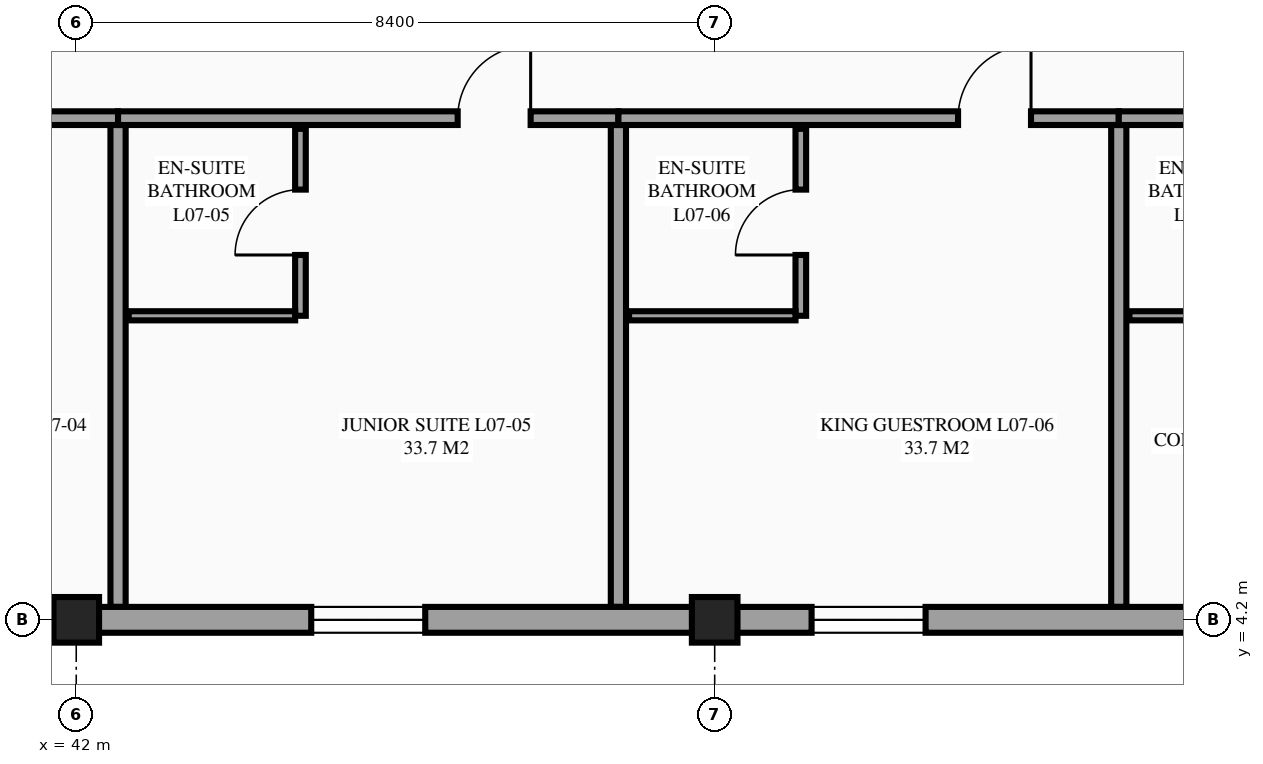
"""IFC4 building model, lengths in metres.
Left out: names, types, materials, properties, quantities, classifications, styles, units other than length and angle.
Written with IfcOpenShell. Run it as: python <this file> out.ifc"""

import sys

from ifc_helpers import new_model, si_unit, direction, frame, frame_2d, origin, origin_2d, place, context, subcontext, project, spatial, rectangle, extrude, element, fill, save


model = new_model("IFC4")
c1 = context("Model", 3, precision=1e-05, world=origin(), true_north=direction((0.0, 1.0)))
c2 = subcontext(c1, "Body", "Model", "MODEL_VIEW")
j1 = project(units=[si_unit("LENGTHUNIT", "METRE"), si_unit("PLANEANGLEUNIT", "RADIAN")], contexts=[c1])
p1 = place(None, origin())
s1 = spatial("IfcSite", under=j1, at=p1, CompositionType="ELEMENT")
p2 = place(p1, origin())
s2 = spatial("IfcBuilding", under=s1, at=p2, CompositionType="ELEMENT")
p3 = place(p2, frame((0.0, 0.0, 29.1)))
s3 = spatial("IfcBuildingStorey", under=s2, at=p3, CompositionType="ELEMENT", Elevation=29.1)
for number, where, z_axis, x_axis in (
    (1, (42.0, 4.2, 0.0), (0.0, 0.0, 1.0), (1.0, 0.0, 0.0)),
    (2, (50.4, 4.2, 0.0), (0.0, 0.0, 1.0), (1.0, 0.0, 0.0)),
):
    element("IfcColumn", number, at=place(p3, frame(where, z_axis=z_axis, x_axis=x_axis)), inside=s3, PredefinedType="COLUMN", context=c2, shape_type="SweptSolid", body=[
        extrude(rectangle(XDim=0.6, YDim=0.6, at=origin_2d()), origin(), (0.0, 0.0, 1.0), 3.6),
    ])
p4 = place(p3, frame((25.2, 4.2, 0.0), z_axis=(0.0, 0.0, 1.0), x_axis=(1.0, 0.0, 0.0)))
e3 = element("IfcWall", 3, at=p4, inside=s3, PredefinedType="STANDARD", context=c2, shape_type="SweptSolid", body=[
    extrude(rectangle(XDim=16.8, YDim=0.34, at=frame_2d((8.4, 0.0))), origin(), (0.0, 0.0, 1.0), 2.53),
])
p5 = place(p4, frame((0.792, 0.0, 0.85)))
e4 = element("IfcOpeningElement", 4, at=p5, cuts=e3, PredefinedType="OPENING", context=c2, shape_type="SweptSolid", body=[
    extrude(rectangle(XDim=1.2, YDim=1.5, at=frame_2d((0.6, 0.75))), frame((0.0, 0.18, 0.0), z_axis=(0.0, -1.0, 0.0), x_axis=(1.0, 0.0, 0.0)), (0.0, 0.0, 1.0), 0.36),
])
p6 = place(p4, frame((6.225, 0.0, 0.85)))
e5 = element("IfcOpeningElement", 5, at=p6, cuts=e3, PredefinedType="OPENING", context=c2, shape_type="SweptSolid", body=[
    extrude(rectangle(XDim=1.5, YDim=1.5, at=frame_2d((0.75, 0.75))), frame((0.0, 0.18, 0.0), z_axis=(0.0, -1.0, 0.0), x_axis=(1.0, 0.0, 0.0)), (0.0, 0.0, 1.0), 0.36),
])
p7 = place(p4, frame((13.308, 0.0, 0.85)))
e6 = element("IfcOpeningElement", 6, at=p7, cuts=e3, PredefinedType="OPENING", context=c2, shape_type="SweptSolid", body=[
    extrude(rectangle(XDim=1.5, YDim=1.5, at=frame_2d((0.75, 0.75))), frame((0.0, 0.18, 0.0), z_axis=(0.0, -1.0, 0.0), x_axis=(1.0, 0.0, 0.0)), (0.0, 0.0, 1.0), 0.36),
])
p8 = place(p3, frame((35.967, 10.8, 0.0), z_axis=(0.0, 0.0, 1.0), x_axis=(1.0, 0.0, 0.0)))
e7 = element("IfcWall", 7, at=p8, inside=s3, PredefinedType="PARTITIONING", context=c2, shape_type="SweptSolid", body=[
    extrude(rectangle(XDim=6.583, YDim=0.18, at=frame_2d((3.292, 0.0))), origin(), (0.0, 0.0, 1.0), 3.375),
])
p9 = place(p8, frame((3.769, 0.0, 0.0)))
e8 = element("IfcOpeningElement", 8, at=p9, cuts=e7, PredefinedType="OPENING", context=c2, shape_type="SweptSolid", body=[
    extrude(rectangle(XDim=0.96, YDim=2.15, at=frame_2d((0.48, 1.075))), frame((0.0, 0.1, 0.0), z_axis=(0.0, -1.0, 0.0), x_axis=(1.0, 0.0, 0.0)), (0.0, 0.0, 1.0), 0.2),
])
p10 = place(p3, frame((42.55, 4.37, 0.0), z_axis=(0.0, 0.0, 1.0), x_axis=(0.0, 1.0, 0.0)))
e9 = element("IfcWall", 9, at=p10, inside=s3, PredefinedType="PARTITIONING", context=c2, shape_type="SweptSolid", body=[
    extrude(rectangle(XDim=6.34, YDim=0.2, at=frame_2d((3.17, 0.0))), origin(), (0.0, 0.0, 1.0), 3.375),
])
p11 = place(p3, frame((42.55, 10.8, 0.0), z_axis=(0.0, 0.0, 1.0), x_axis=(1.0, 0.0, 0.0)))
e10 = element("IfcWall", 10, at=p11, inside=s3, PredefinedType="PARTITIONING", context=c2, shape_type="SweptSolid", body=[
    extrude(rectangle(XDim=6.583, YDim=0.18, at=frame_2d((3.292, 0.0))), origin(), (0.0, 0.0, 1.0), 3.375),
])
p12 = place(p11, frame((4.469, 0.0, 0.0)))
e11 = element("IfcOpeningElement", 11, at=p12, cuts=e10, PredefinedType="OPENING", context=c2, shape_type="SweptSolid", body=[
    extrude(rectangle(XDim=0.96, YDim=2.15, at=frame_2d((0.48, 1.075))), frame((0.0, 0.1, 0.0), z_axis=(0.0, -1.0, 0.0), x_axis=(1.0, 0.0, 0.0)), (0.0, 0.0, 1.0), 0.2),
])
p13 = place(p3, frame((49.133, 4.37, 0.0), z_axis=(0.0, 0.0, 1.0), x_axis=(0.0, 1.0, 0.0)))
e12 = element("IfcWall", 12, at=p13, inside=s3, PredefinedType="PARTITIONING", context=c2, shape_type="SweptSolid", body=[
    extrude(rectangle(XDim=6.34, YDim=0.2, at=frame_2d((3.17, 0.0))), origin(), (0.0, 0.0, 1.0), 3.375),
])
p14 = place(p3, frame((44.95, 8.2, 0.0), z_axis=(0.0, 0.0, 1.0), x_axis=(0.0, 1.0, 0.0)))
e13 = element("IfcWall", 13, at=p14, inside=s3, PredefinedType="PARTITIONING", context=c2, shape_type="SweptSolid", body=[
    extrude(rectangle(XDim=2.46, YDim=0.14, at=frame_2d((1.23, 0.0))), origin(), (0.0, 0.0, 1.0), 3.375),
])
p15 = place(p14, frame((0.8, 0.0, 0.0)))
e14 = element("IfcOpeningElement", 14, at=p15, cuts=e13, PredefinedType="OPENING", context=c2, shape_type="SweptSolid", body=[
    extrude(rectangle(XDim=0.86, YDim=2.1, at=frame_2d((0.43, 1.05))), frame((0.0, 0.08, 0.0), z_axis=(0.0, -1.0, 0.0), x_axis=(1.0, 0.0, 0.0)), (0.0, 0.0, 1.0), 0.16),
])
p16 = place(p3, frame((42.69, 8.2, 0.0), z_axis=(0.0, 0.0, 1.0), x_axis=(1.0, 0.0, 0.0)))
e15 = element("IfcWall", 15, at=p16, inside=s3, PredefinedType="PARTITIONING", context=c2, shape_type="SweptSolid", body=[
    extrude(rectangle(XDim=2.19, YDim=0.12, at=frame_2d((1.095, 0.0))), origin(), (0.0, 0.0, 1.0), 3.375),
])
p17 = place(p3, frame((49.133, 10.8, 0.0), z_axis=(0.0, 0.0, 1.0), x_axis=(1.0, 0.0, 0.0)))
e16 = element("IfcWall", 16, at=p17, inside=s3, PredefinedType="PARTITIONING", context=c2, shape_type="SweptSolid", body=[
    extrude(rectangle(XDim=6.583, YDim=0.18, at=frame_2d((3.292, 0.0))), origin(), (0.0, 0.0, 1.0), 3.375),
])
p18 = place(p17, frame((4.469, 0.0, 0.0)))
e17 = element("IfcOpeningElement", 17, at=p18, cuts=e16, PredefinedType="OPENING", context=c2, shape_type="SweptSolid", body=[
    extrude(rectangle(XDim=0.96, YDim=2.15, at=frame_2d((0.48, 1.075))), frame((0.0, 0.1, 0.0), z_axis=(0.0, -1.0, 0.0), x_axis=(1.0, 0.0, 0.0)), (0.0, 0.0, 1.0), 0.2),
])
p19 = place(p3, frame((55.717, 4.37, 0.0), z_axis=(0.0, 0.0, 1.0), x_axis=(0.0, 1.0, 0.0)))
e18 = element("IfcWall", 18, at=p19, inside=s3, PredefinedType="PARTITIONING", context=c2, shape_type="SweptSolid", body=[
    extrude(rectangle(XDim=6.34, YDim=0.2, at=frame_2d((3.17, 0.0))), origin(), (0.0, 0.0, 1.0), 3.375),
])
p20 = place(p3, frame((51.533, 8.2, 0.0), z_axis=(0.0, 0.0, 1.0), x_axis=(0.0, 1.0, 0.0)))
e19 = element("IfcWall", 19, at=p20, inside=s3, PredefinedType="PARTITIONING", context=c2, shape_type="SweptSolid", body=[
    extrude(rectangle(XDim=2.46, YDim=0.14, at=frame_2d((1.23, 0.0))), origin(), (0.0, 0.0, 1.0), 3.375),
])
p21 = place(p20, frame((0.8, 0.0, 0.0)))
e20 = element("IfcOpeningElement", 20, at=p21, cuts=e19, PredefinedType="OPENING", context=c2, shape_type="SweptSolid", body=[
    extrude(rectangle(XDim=0.86, YDim=2.1, at=frame_2d((0.43, 1.05))), frame((0.0, 0.08, 0.0), z_axis=(0.0, -1.0, 0.0), x_axis=(1.0, 0.0, 0.0)), (0.0, 0.0, 1.0), 0.16),
])
p22 = place(p3, frame((49.273, 8.2, 0.0), z_axis=(0.0, 0.0, 1.0), x_axis=(1.0, 0.0, 0.0)))
e21 = element("IfcWall", 21, at=p22, inside=s3, PredefinedType="PARTITIONING", context=c2, shape_type="SweptSolid", body=[
    extrude(rectangle(XDim=2.19, YDim=0.12, at=frame_2d((1.095, 0.0))), origin(), (0.0, 0.0, 1.0), 3.375),
])
p23 = place(p3, frame((55.717, 10.8, 0.0), z_axis=(0.0, 0.0, 1.0), x_axis=(1.0, 0.0, 0.0)))
e22 = element("IfcWall", 22, at=p23, inside=s3, PredefinedType="PARTITIONING", context=c2, shape_type="SweptSolid", body=[
    extrude(rectangle(XDim=6.583, YDim=0.18, at=frame_2d((3.292, 0.0))), origin(), (0.0, 0.0, 1.0), 3.375),
])
p24 = place(p23, frame((4.469, 0.0, 0.0)))
e23 = element("IfcOpeningElement", 23, at=p24, cuts=e22, PredefinedType="OPENING", context=c2, shape_type="SweptSolid", body=[
    extrude(rectangle(XDim=0.96, YDim=2.15, at=frame_2d((0.48, 1.075))), frame((0.0, 0.1, 0.0), z_axis=(0.0, -1.0, 0.0), x_axis=(1.0, 0.0, 0.0)), (0.0, 0.0, 1.0), 0.2),
])
p25 = place(p3, frame((55.857, 8.2, 0.0), z_axis=(0.0, 0.0, 1.0), x_axis=(1.0, 0.0, 0.0)))
e24 = element("IfcWall", 24, at=p25, inside=s3, PredefinedType="PARTITIONING", context=c2, shape_type="SweptSolid", body=[
    extrude(rectangle(XDim=2.19, YDim=0.12, at=frame_2d((1.095, 0.0))), origin(), (0.0, 0.0, 1.0), 3.375),
])
p26 = place(p3, frame((42.0, 4.2, 0.0), z_axis=(0.0, 0.0, 1.0), x_axis=(1.0, 0.0, 0.0)))
e25 = element("IfcWall", 25, at=p26, inside=s3, PredefinedType="STANDARD", context=c2, shape_type="SweptSolid", body=[
    extrude(rectangle(XDim=8.4, YDim=0.34, at=frame_2d((4.2, 0.0))), origin(), (0.0, 0.0, 1.0), 2.88),
])
p27 = place(p26, frame((3.092, 0.0, 0.85)))
e26 = element("IfcOpeningElement", 26, at=p27, cuts=e25, PredefinedType="OPENING", context=c2, shape_type="SweptSolid", body=[
    extrude(rectangle(XDim=1.5, YDim=1.5, at=frame_2d((0.75, 0.75))), frame((0.0, 0.18, 0.0), z_axis=(0.0, -1.0, 0.0), x_axis=(1.0, 0.0, 0.0)), (0.0, 0.0, 1.0), 0.36),
])
p28 = place(p3, frame((50.4, 4.2, 0.0), z_axis=(0.0, 0.0, 1.0), x_axis=(1.0, 0.0, 0.0)))
e27 = element("IfcWall", 27, at=p28, inside=s3, PredefinedType="STANDARD", context=c2, shape_type="SweptSolid", body=[
    extrude(rectangle(XDim=8.4, YDim=0.34, at=frame_2d((4.2, 0.0))), origin(), (0.0, 0.0, 1.0), 2.63),
])
p29 = place(p28, frame((1.275, 0.0, 0.85)))
e28 = element("IfcOpeningElement", 28, at=p29, cuts=e27, PredefinedType="OPENING", context=c2, shape_type="SweptSolid", body=[
    extrude(rectangle(XDim=1.5, YDim=1.5, at=frame_2d((0.75, 0.75))), frame((0.0, 0.18, 0.0), z_axis=(0.0, -1.0, 0.0), x_axis=(1.0, 0.0, 0.0)), (0.0, 0.0, 1.0), 0.36),
])
p30 = place(p27, origin())
e29 = element("IfcWindow", 29, at=p30, inside=s3, PartitioningType="SINGLE_PANEL", PredefinedType="WINDOW", context=c2, shape_type="SweptSolid", body=[
    extrude(rectangle(XDim=1.5, YDim=1.5, at=frame_2d((0.75, 0.75))), frame((0.0, 0.03, 0.0), z_axis=(0.0, -1.0, 0.0), x_axis=(1.0, 0.0, 0.0)), (0.0, 0.0, 1.0), 0.06),
])
fill(e26, e29)
p31 = place(p29, origin())
e30 = element("IfcWindow", 30, at=p31, inside=s3, PartitioningType="SINGLE_PANEL", PredefinedType="WINDOW", context=c2, shape_type="SweptSolid", body=[
    extrude(rectangle(XDim=1.5, YDim=1.5, at=frame_2d((0.75, 0.75))), frame((0.0, 0.03, 0.0), z_axis=(0.0, -1.0, 0.0), x_axis=(1.0, 0.0, 0.0)), (0.0, 0.0, 1.0), 0.06),
])
fill(e28, e30)
p32 = place(p12, origin())
e31 = element("IfcDoor", 31, at=p32, inside=s3, OperationType="SINGLE_SWING_RIGHT", PredefinedType="DOOR", context=c2, shape_type="SweptSolid", body=[
    extrude(rectangle(XDim=0.96, YDim=2.15, at=frame_2d((0.48, 1.075))), frame((0.0, 0.025, 0.0), z_axis=(0.0, -1.0, 0.0), x_axis=(1.0, 0.0, 0.0)), (0.0, 0.0, 1.0), 0.05),
])
fill(e11, e31)
p33 = place(p15, origin())
e32 = element("IfcDoor", 32, at=p33, inside=s3, OperationType="SINGLE_SWING_LEFT", PredefinedType="DOOR", context=c2, shape_type="SweptSolid", body=[
    extrude(rectangle(XDim=0.86, YDim=2.1, at=frame_2d((0.43, 1.05))), frame((0.0, 0.025, 0.0), z_axis=(0.0, -1.0, 0.0), x_axis=(1.0, 0.0, 0.0)), (0.0, 0.0, 1.0), 0.05),
])
fill(e14, e32)
p34 = place(p18, origin())
e33 = element("IfcDoor", 33, at=p34, inside=s3, OperationType="SINGLE_SWING_RIGHT", PredefinedType="DOOR", context=c2, shape_type="SweptSolid", body=[
    extrude(rectangle(XDim=0.96, YDim=2.15, at=frame_2d((0.48, 1.075))), frame((0.0, 0.025, 0.0), z_axis=(0.0, -1.0, 0.0), x_axis=(1.0, 0.0, 0.0)), (0.0, 0.0, 1.0), 0.05),
])
fill(e17, e33)
p35 = place(p21, origin())
e34 = element("IfcDoor", 34, at=p35, inside=s3, OperationType="SINGLE_SWING_LEFT", PredefinedType="DOOR", context=c2, shape_type="SweptSolid", body=[
    extrude(rectangle(XDim=0.86, YDim=2.1, at=frame_2d((0.43, 1.05))), frame((0.0, 0.025, 0.0), z_axis=(0.0, -1.0, 0.0), x_axis=(1.0, 0.0, 0.0)), (0.0, 0.0, 1.0), 0.05),
])
fill(e20, e34)
save(model, sys.argv[1])
